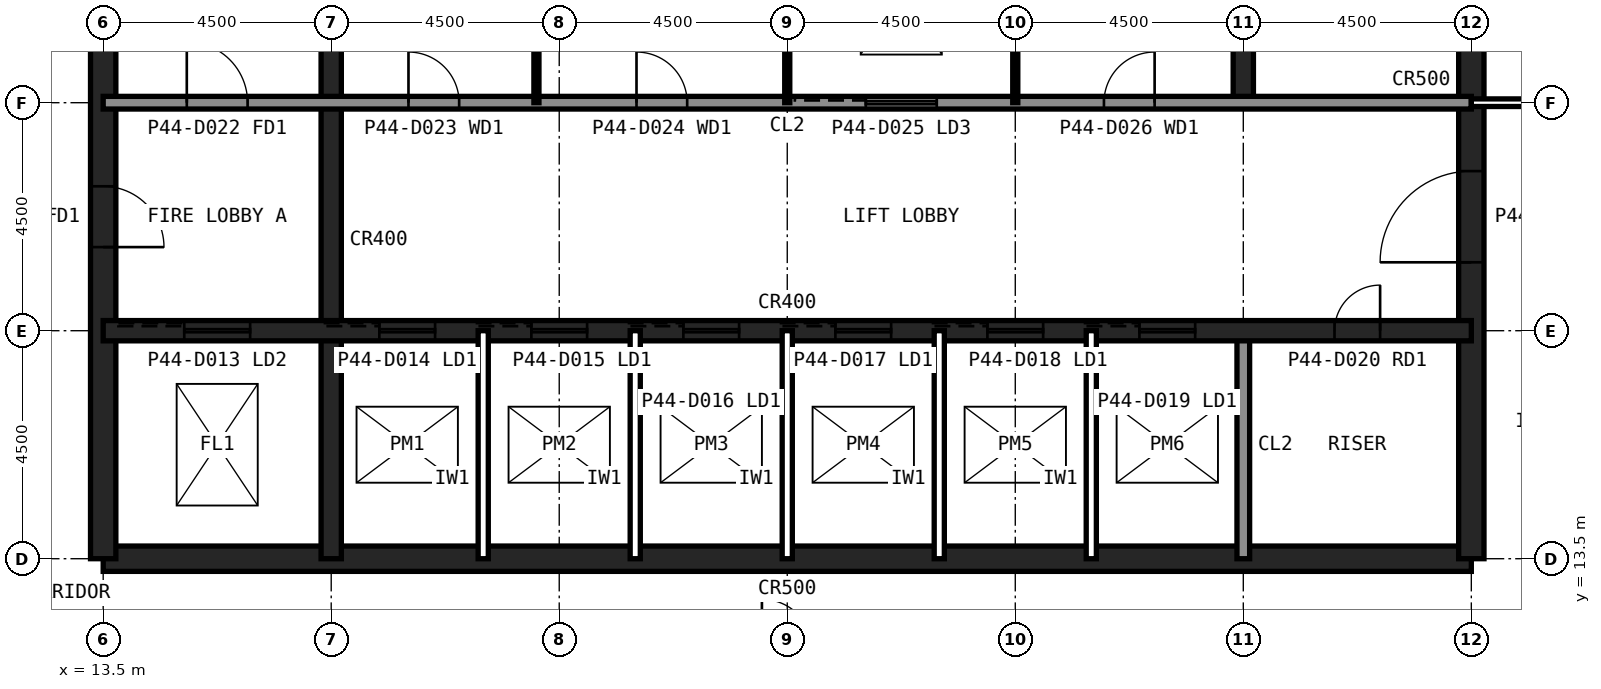
"""IFC4 building model, lengths in metres.
Left out: names, types, materials, properties, quantities, classifications, styles, units other than length and angle.
Written with IfcOpenShell. Run it as: python <this file> out.ifc"""

import sys

from ifc_helpers import new_model, si_unit, direction, frame, frame_2d, origin, place, context, subcontext, project, spatial, rectangle, extrude, element, fill, save


model = new_model("IFC4")
c1 = context("Model", 3, precision=1e-05, world=origin(), true_north=direction((0.0, 1.0)))
c2 = subcontext(c1, "Body", "Model", "MODEL_VIEW")
j1 = project(units=[si_unit("LENGTHUNIT", "METRE"), si_unit("PLANEANGLEUNIT", "RADIAN")], contexts=[c1])
p1 = place(None, origin())
s1 = spatial("IfcSite", under=j1, at=p1, CompositionType="ELEMENT")
p2 = place(p1, origin())
s2 = spatial("IfcBuilding", under=s1, at=p2, CompositionType="ELEMENT")
p3 = place(p2, frame((0.0, 0.0, 183.6)))
s3 = spatial("IfcBuildingStorey", under=s2, at=p3, CompositionType="ELEMENT", Elevation=183.6)
p4 = place(p3, frame((13.5, 13.5, 0.0), z_axis=(0.0, 0.0, 1.0), x_axis=(1.0, 0.0, 0.0)))
e1 = element("IfcWall", 1, at=p4, inside=s3, PredefinedType="SHEAR", context=c2, shape_type="SweptSolid", body=[
    extrude(rectangle(XDim=27.0, YDim=0.5, at=frame_2d((13.5, 0.0))), origin(), (0.0, 0.0, 1.0), 4.0),
])
p5 = place(p3, frame((40.5, 13.5, 0.0), z_axis=(0.0, 0.0, 1.0), x_axis=(0.0, 1.0, 0.0)))
e2 = element("IfcWall", 2, at=p5, inside=s3, PredefinedType="SHEAR", context=c2, shape_type="SweptSolid", body=[
    extrude(rectangle(XDim=27.0, YDim=0.5, at=frame_2d((13.5, 0.0))), origin(), (0.0, 0.0, 1.0), 4.0),
])
p6 = place(p5, frame((5.85, 0.0, 0.0)))
e3 = element("IfcOpeningElement", 3, at=p6, cuts=e2, PredefinedType="OPENING", context=c2, shape_type="SweptSolid", body=[
    extrude(rectangle(XDim=1.8, YDim=2.1, at=frame_2d((0.9, 1.05))), frame((0.0, 0.26, 0.0), z_axis=(0.0, -1.0, 0.0), x_axis=(1.0, 0.0, 0.0)), (0.0, 0.0, 1.0), 0.52),
])
p7 = place(p5, frame((19.65, 0.0, 0.0)))
e4 = element("IfcOpeningElement", 4, at=p7, cuts=e2, PredefinedType="OPENING", context=c2, shape_type="SweptSolid", body=[
    extrude(rectangle(XDim=1.2, YDim=2.1, at=frame_2d((0.6, 1.05))), frame((0.0, 0.26, 0.0), z_axis=(0.0, -1.0, 0.0), x_axis=(1.0, 0.0, 0.0)), (0.0, 0.0, 1.0), 0.52),
])
p8 = place(p3, frame((13.5, 40.5, 0.0), z_axis=(0.0, 0.0, 1.0), x_axis=(0.0, -1.0, 0.0)))
e5 = element("IfcWall", 5, at=p8, inside=s3, PredefinedType="SHEAR", context=c2, shape_type="SweptSolid", body=[
    extrude(rectangle(XDim=27.0, YDim=0.5, at=frame_2d((13.5, 0.0))), origin(), (0.0, 0.0, 1.0), 4.0),
])
p9 = place(p8, frame((19.65, 0.0, 0.0)))
e6 = element("IfcOpeningElement", 6, at=p9, cuts=e5, PredefinedType="OPENING", context=c2, shape_type="SweptSolid", body=[
    extrude(rectangle(XDim=1.2, YDim=2.1, at=frame_2d((0.6, 1.05))), frame((0.0, 0.26, 0.0), z_axis=(0.0, -1.0, 0.0), x_axis=(1.0, 0.0, 0.0)), (0.0, 0.0, 1.0), 0.52),
])
p10 = place(p8, frame((5.85, 0.0, 0.0)))
e7 = element("IfcOpeningElement", 7, at=p10, cuts=e5, PredefinedType="OPENING", context=c2, shape_type="SweptSolid", body=[
    extrude(rectangle(XDim=1.8, YDim=2.1, at=frame_2d((0.9, 1.05))), frame((0.0, 0.26, 0.0), z_axis=(0.0, -1.0, 0.0), x_axis=(1.0, 0.0, 0.0)), (0.0, 0.0, 1.0), 0.52),
])
p11 = place(p3, frame((18.0, 13.5, 0.0), z_axis=(0.0, 0.0, 1.0), x_axis=(0.0, 1.0, 0.0)))
e8 = element("IfcWall", 8, at=p11, inside=s3, PredefinedType="SHEAR", context=c2, shape_type="SweptSolid", body=[
    extrude(rectangle(XDim=18.0, YDim=0.4, at=frame_2d((9.0, 0.0))), origin(), (0.0, 0.0, 1.0), 4.0),
])
p12 = place(p3, frame((36.0, 13.5, 0.0), z_axis=(0.0, 0.0, 1.0), x_axis=(0.0, 1.0, 0.0)))
e9 = element("IfcWall", 9, at=p12, inside=s3, PredefinedType="SOLIDWALL", context=c2, shape_type="SweptSolid", body=[
    extrude(rectangle(XDim=4.5, YDim=0.25, at=frame_2d((2.25, 0.0))), origin(), (0.0, 0.0, 1.0), 3.84),
])
p13 = place(p3, frame((36.0, 22.5, 0.0), z_axis=(0.0, 0.0, 1.0), x_axis=(0.0, 1.0, 0.0)))
e10 = element("IfcWall", 10, at=p13, inside=s3, PredefinedType="SHEAR", context=c2, shape_type="SweptSolid", body=[
    extrude(rectangle(XDim=18.0, YDim=0.4, at=frame_2d((9.0, 0.0))), origin(), (0.0, 0.0, 1.0), 4.0),
])
p14 = place(p3, frame((13.5, 18.0, 0.0), z_axis=(0.0, 0.0, 1.0), x_axis=(1.0, 0.0, 0.0)))
e11 = element("IfcWall", 11, at=p14, inside=s3, PredefinedType="SHEAR", context=c2, shape_type="SweptSolid", body=[
    extrude(rectangle(XDim=27.0, YDim=0.4, at=frame_2d((13.5, 0.0))), origin(), (0.0, 0.0, 1.0), 4.0),
])
p15 = place(p14, frame((24.3, 0.0, 0.0)))
e12 = element("IfcOpeningElement", 12, at=p15, cuts=e11, PredefinedType="OPENING", context=c2, shape_type="SweptSolid", body=[
    extrude(rectangle(XDim=0.9, YDim=2.1, at=frame_2d((0.45, 1.05))), frame((0.0, 0.21, 0.0), z_axis=(0.0, -1.0, 0.0), x_axis=(1.0, 0.0, 0.0)), (0.0, 0.0, 1.0), 0.42),
])
p16 = place(p14, frame((5.45, 0.0, 0.0)))
e13 = element("IfcOpeningElement", 13, at=p16, cuts=e11, PredefinedType="OPENING", context=c2, shape_type="SweptSolid", body=[
    extrude(rectangle(XDim=1.1, YDim=2.1, at=frame_2d((0.55, 1.05))), frame((0.0, 0.21, 0.0), z_axis=(0.0, -1.0, 0.0), x_axis=(1.0, 0.0, 0.0)), (0.0, 0.0, 1.0), 0.42),
])
p17 = place(p14, frame((8.45, 0.0, 0.0)))
e14 = element("IfcOpeningElement", 14, at=p17, cuts=e11, PredefinedType="OPENING", context=c2, shape_type="SweptSolid", body=[
    extrude(rectangle(XDim=1.1, YDim=2.1, at=frame_2d((0.55, 1.05))), frame((0.0, 0.21, 0.0), z_axis=(0.0, -1.0, 0.0), x_axis=(1.0, 0.0, 0.0)), (0.0, 0.0, 1.0), 0.42),
])
p18 = place(p14, frame((11.45, 0.0, 0.0)))
e15 = element("IfcOpeningElement", 15, at=p18, cuts=e11, PredefinedType="OPENING", context=c2, shape_type="SweptSolid", body=[
    extrude(rectangle(XDim=1.1, YDim=2.1, at=frame_2d((0.55, 1.05))), frame((0.0, 0.21, 0.0), z_axis=(0.0, -1.0, 0.0), x_axis=(1.0, 0.0, 0.0)), (0.0, 0.0, 1.0), 0.42),
])
p19 = place(p14, frame((14.45, 0.0, 0.0)))
e16 = element("IfcOpeningElement", 16, at=p19, cuts=e11, PredefinedType="OPENING", context=c2, shape_type="SweptSolid", body=[
    extrude(rectangle(XDim=1.1, YDim=2.1, at=frame_2d((0.55, 1.05))), frame((0.0, 0.21, 0.0), z_axis=(0.0, -1.0, 0.0), x_axis=(1.0, 0.0, 0.0)), (0.0, 0.0, 1.0), 0.42),
])
p20 = place(p14, frame((17.45, 0.0, 0.0)))
e17 = element("IfcOpeningElement", 17, at=p20, cuts=e11, PredefinedType="OPENING", context=c2, shape_type="SweptSolid", body=[
    extrude(rectangle(XDim=1.1, YDim=2.1, at=frame_2d((0.55, 1.05))), frame((0.0, 0.21, 0.0), z_axis=(0.0, -1.0, 0.0), x_axis=(1.0, 0.0, 0.0)), (0.0, 0.0, 1.0), 0.42),
])
p21 = place(p14, frame((20.45, 0.0, 0.0)))
e18 = element("IfcOpeningElement", 18, at=p21, cuts=e11, PredefinedType="OPENING", context=c2, shape_type="SweptSolid", body=[
    extrude(rectangle(XDim=1.1, YDim=2.1, at=frame_2d((0.55, 1.05))), frame((0.0, 0.21, 0.0), z_axis=(0.0, -1.0, 0.0), x_axis=(1.0, 0.0, 0.0)), (0.0, 0.0, 1.0), 0.42),
])
p22 = place(p14, frame((1.6, 0.0, 0.0)))
e19 = element("IfcOpeningElement", 19, at=p22, cuts=e11, PredefinedType="OPENING", context=c2, shape_type="SweptSolid", body=[
    extrude(rectangle(XDim=1.3, YDim=2.2, at=frame_2d((0.65, 1.1))), frame((0.0, 0.21, 0.0), z_axis=(0.0, -1.0, 0.0), x_axis=(1.0, 0.0, 0.0)), (0.0, 0.0, 1.0), 0.42),
])
p23 = place(p3, frame((13.5, 22.5, 0.0), z_axis=(0.0, 0.0, 1.0), x_axis=(1.0, 0.0, 0.0)))
e20 = element("IfcWall", 20, at=p23, inside=s3, PredefinedType="SOLIDWALL", context=c2, shape_type="SweptSolid", body=[
    extrude(rectangle(XDim=27.0, YDim=0.25, at=frame_2d((13.5, 0.0))), origin(), (0.0, 0.0, 1.0), 3.84),
])
p24 = place(p23, frame((1.65, 0.0, 0.0)))
e21 = element("IfcOpeningElement", 21, at=p24, cuts=e20, PredefinedType="OPENING", context=c2, shape_type="SweptSolid", body=[
    extrude(rectangle(XDim=1.2, YDim=2.1, at=frame_2d((0.6, 1.05))), frame((0.0, 0.135, 0.0), z_axis=(0.0, -1.0, 0.0), x_axis=(1.0, 0.0, 0.0)), (0.0, 0.0, 1.0), 0.27),
])
p25 = place(p23, frame((6.025, 0.0, 0.0)))
e22 = element("IfcOpeningElement", 22, at=p25, cuts=e20, PredefinedType="OPENING", context=c2, shape_type="SweptSolid", body=[
    extrude(rectangle(XDim=1.0, YDim=2.1, at=frame_2d((0.5, 1.05))), frame((0.0, 0.135, 0.0), z_axis=(0.0, -1.0, 0.0), x_axis=(1.0, 0.0, 0.0)), (0.0, 0.0, 1.0), 0.27),
])
p26 = place(p23, frame((10.525, 0.0, 0.0)))
e23 = element("IfcOpeningElement", 23, at=p26, cuts=e20, PredefinedType="OPENING", context=c2, shape_type="SweptSolid", body=[
    extrude(rectangle(XDim=1.0, YDim=2.1, at=frame_2d((0.5, 1.05))), frame((0.0, 0.135, 0.0), z_axis=(0.0, -1.0, 0.0), x_axis=(1.0, 0.0, 0.0)), (0.0, 0.0, 1.0), 0.27),
])
p27 = place(p23, frame((19.75, 0.0, 0.0)))
e24 = element("IfcOpeningElement", 24, at=p27, cuts=e20, PredefinedType="OPENING", context=c2, shape_type="SweptSolid", body=[
    extrude(rectangle(XDim=1.0, YDim=2.1, at=frame_2d((0.5, 1.05))), frame((0.0, 0.135, 0.0), z_axis=(0.0, -1.0, 0.0), x_axis=(1.0, 0.0, 0.0)), (0.0, 0.0, 1.0), 0.27),
])
p28 = place(p23, frame((15.05, 0.0, 0.0)))
e25 = element("IfcOpeningElement", 25, at=p28, cuts=e20, PredefinedType="OPENING", context=c2, shape_type="SweptSolid", body=[
    extrude(rectangle(XDim=1.4, YDim=2.4, at=frame_2d((0.7, 1.2))), frame((0.0, 0.135, 0.0), z_axis=(0.0, -1.0, 0.0), x_axis=(1.0, 0.0, 0.0)), (0.0, 0.0, 1.0), 0.27),
])
for number, where, z_axis, x_axis in (
    (26, (21.0, 13.5, 0.0), (0.0, 0.0, 1.0), (0.0, 1.0, 0.0)),
    (27, (24.0, 13.5, 0.0), (0.0, 0.0, 1.0), (0.0, 1.0, 0.0)),
    (28, (27.0, 13.5, 0.0), (0.0, 0.0, 1.0), (0.0, 1.0, 0.0)),
    (29, (30.0, 13.5, 0.0), (0.0, 0.0, 1.0), (0.0, 1.0, 0.0)),
    (30, (33.0, 13.5, 0.0), (0.0, 0.0, 1.0), (0.0, 1.0, 0.0)),
):
    element("IfcWall", number, at=place(p3, frame(where, z_axis=z_axis, x_axis=x_axis)), inside=s3, PredefinedType="PARTITIONING", context=c2, shape_type="SweptSolid", body=[
        extrude(rectangle(XDim=4.5, YDim=0.2, at=frame_2d((2.25, 0.0))), origin(), (0.0, 0.0, 1.0), 3.84),
    ])
for number, where, z_axis, x_axis in (
    (31, (22.05, 22.5, 0.0), (0.0, 0.0, 1.0), (0.0, 1.0, 0.0)),
    (32, (27.0, 22.5, 0.0), (0.0, 0.0, 1.0), (0.0, 1.0, 0.0)),
    (33, (31.5, 22.5, 0.0), (0.0, 0.0, 1.0), (0.0, 1.0, 0.0)),
):
    element("IfcWall", number, at=place(p3, frame(where, z_axis=z_axis, x_axis=x_axis)), inside=s3, PredefinedType="PLUMBINGWALL", context=c2, shape_type="SweptSolid", body=[
        extrude(rectangle(XDim=9.0, YDim=0.1, at=frame_2d((4.5, 0.0))), origin(), (0.0, 0.0, 1.0), 3.84),
    ])
p29 = place(p3, frame((40.5, 22.5, 0.0), z_axis=(0.0, 0.0, 1.0), x_axis=(1.0, 0.0, 0.0)))
e34 = element("IfcWall", 34, at=p29, inside=s3, PredefinedType="PARTITIONING", context=c2, shape_type="SweptSolid", body=[
    extrude(rectangle(XDim=6.75, YDim=0.15, at=frame_2d((3.375, 0.0))), origin(), (0.0, 0.0, 1.0), 2.989),
])
p30 = place(p9, origin())
e35 = element("IfcDoor", 35, at=p30, inside=s3, OperationType="SINGLE_SWING_RIGHT", PredefinedType="DOOR", context=c2, shape_type="SweptSolid", body=[
    extrude(rectangle(XDim=1.2, YDim=2.1, at=frame_2d((0.6, 1.05))), frame((0.0, 0.025, 0.0), z_axis=(0.0, -1.0, 0.0), x_axis=(1.0, 0.0, 0.0)), (0.0, 0.0, 1.0), 0.05),
])
fill(e6, e35)
p31 = place(p6, origin())
e36 = element("IfcDoor", 36, at=p31, inside=s3, OperationType="SINGLE_SWING_LEFT", PredefinedType="DOOR", context=c2, shape_type="SweptSolid", body=[
    extrude(rectangle(XDim=1.8, YDim=2.1, at=frame_2d((0.9, 1.05))), frame((0.0, 0.025, 0.0), z_axis=(0.0, -1.0, 0.0), x_axis=(1.0, 0.0, 0.0)), (0.0, 0.0, 1.0), 0.05),
])
fill(e3, e36)
p32 = place(p24, origin())
e37 = element("IfcDoor", 37, at=p32, inside=s3, OperationType="SINGLE_SWING_LEFT", PredefinedType="DOOR", context=c2, shape_type="SweptSolid", body=[
    extrude(rectangle(XDim=1.2, YDim=2.1, at=frame_2d((0.6, 1.05))), frame((0.0, 0.025, 0.0), z_axis=(0.0, -1.0, 0.0), x_axis=(1.0, 0.0, 0.0)), (0.0, 0.0, 1.0), 0.05),
])
fill(e21, e37)
p33 = place(p25, origin())
e38 = element("IfcDoor", 38, at=p33, inside=s3, OperationType="SINGLE_SWING_LEFT", PredefinedType="DOOR", context=c2, shape_type="SweptSolid", body=[
    extrude(rectangle(XDim=1.0, YDim=2.1, at=frame_2d((0.5, 1.05))), frame((0.0, 0.025, 0.0), z_axis=(0.0, -1.0, 0.0), x_axis=(1.0, 0.0, 0.0)), (0.0, 0.0, 1.0), 0.05),
])
fill(e22, e38)
p34 = place(p26, origin())
e39 = element("IfcDoor", 39, at=p34, inside=s3, OperationType="SINGLE_SWING_LEFT", PredefinedType="DOOR", context=c2, shape_type="SweptSolid", body=[
    extrude(rectangle(XDim=1.0, YDim=2.1, at=frame_2d((0.5, 1.05))), frame((0.0, 0.025, 0.0), z_axis=(0.0, -1.0, 0.0), x_axis=(1.0, 0.0, 0.0)), (0.0, 0.0, 1.0), 0.05),
])
fill(e23, e39)
p35 = place(p27, origin())
e40 = element("IfcDoor", 40, at=p35, inside=s3, OperationType="SINGLE_SWING_RIGHT", PredefinedType="DOOR", context=c2, shape_type="SweptSolid", body=[
    extrude(rectangle(XDim=1.0, YDim=2.1, at=frame_2d((0.5, 1.05))), frame((0.0, 0.025, 0.0), z_axis=(0.0, -1.0, 0.0), x_axis=(1.0, 0.0, 0.0)), (0.0, 0.0, 1.0), 0.05),
])
fill(e24, e40)
p36 = place(p15, origin())
e41 = element("IfcDoor", 41, at=p36, inside=s3, OperationType="SINGLE_SWING_RIGHT", PredefinedType="DOOR", context=c2, shape_type="SweptSolid", body=[
    extrude(rectangle(XDim=0.9, YDim=2.1, at=frame_2d((0.45, 1.05))), frame((0.0, 0.025, 0.0), z_axis=(0.0, -1.0, 0.0), x_axis=(1.0, 0.0, 0.0)), (0.0, 0.0, 1.0), 0.05),
])
fill(e12, e41)
p37 = place(p16, origin())
e42 = element("IfcDoor", 42, at=p37, inside=s3, OperationType="SLIDING_TO_LEFT", PredefinedType="DOOR", context=c2, shape_type="SweptSolid", body=[
    extrude(rectangle(XDim=1.1, YDim=2.1, at=frame_2d((0.55, 1.05))), frame((0.0, 0.025, 0.0), z_axis=(0.0, -1.0, 0.0), x_axis=(1.0, 0.0, 0.0)), (0.0, 0.0, 1.0), 0.05),
])
fill(e13, e42)
p38 = place(p17, origin())
e43 = element("IfcDoor", 43, at=p38, inside=s3, OperationType="SLIDING_TO_LEFT", PredefinedType="DOOR", context=c2, shape_type="SweptSolid", body=[
    extrude(rectangle(XDim=1.1, YDim=2.1, at=frame_2d((0.55, 1.05))), frame((0.0, 0.025, 0.0), z_axis=(0.0, -1.0, 0.0), x_axis=(1.0, 0.0, 0.0)), (0.0, 0.0, 1.0), 0.05),
])
fill(e14, e43)
p39 = place(p18, origin())
e44 = element("IfcDoor", 44, at=p39, inside=s3, OperationType="SLIDING_TO_LEFT", PredefinedType="DOOR", context=c2, shape_type="SweptSolid", body=[
    extrude(rectangle(XDim=1.1, YDim=2.1, at=frame_2d((0.55, 1.05))), frame((0.0, 0.025, 0.0), z_axis=(0.0, -1.0, 0.0), x_axis=(1.0, 0.0, 0.0)), (0.0, 0.0, 1.0), 0.05),
])
fill(e15, e44)
p40 = place(p19, origin())
e45 = element("IfcDoor", 45, at=p40, inside=s3, OperationType="SLIDING_TO_LEFT", PredefinedType="DOOR", context=c2, shape_type="SweptSolid", body=[
    extrude(rectangle(XDim=1.1, YDim=2.1, at=frame_2d((0.55, 1.05))), frame((0.0, 0.025, 0.0), z_axis=(0.0, -1.0, 0.0), x_axis=(1.0, 0.0, 0.0)), (0.0, 0.0, 1.0), 0.05),
])
fill(e16, e45)
p41 = place(p20, origin())
e46 = element("IfcDoor", 46, at=p41, inside=s3, OperationType="SLIDING_TO_LEFT", PredefinedType="DOOR", context=c2, shape_type="SweptSolid", body=[
    extrude(rectangle(XDim=1.1, YDim=2.1, at=frame_2d((0.55, 1.05))), frame((0.0, 0.025, 0.0), z_axis=(0.0, -1.0, 0.0), x_axis=(1.0, 0.0, 0.0)), (0.0, 0.0, 1.0), 0.05),
])
fill(e17, e46)
p42 = place(p21, origin())
e47 = element("IfcDoor", 47, at=p42, inside=s3, OperationType="SLIDING_TO_LEFT", PredefinedType="DOOR", context=c2, shape_type="SweptSolid", body=[
    extrude(rectangle(XDim=1.1, YDim=2.1, at=frame_2d((0.55, 1.05))), frame((0.0, 0.025, 0.0), z_axis=(0.0, -1.0, 0.0), x_axis=(1.0, 0.0, 0.0)), (0.0, 0.0, 1.0), 0.05),
])
fill(e18, e47)
p43 = place(p22, origin())
e48 = element("IfcDoor", 48, at=p43, inside=s3, OperationType="SLIDING_TO_LEFT", PredefinedType="DOOR", context=c2, shape_type="SweptSolid", body=[
    extrude(rectangle(XDim=1.3, YDim=2.2, at=frame_2d((0.65, 1.1))), frame((0.0, 0.025, 0.0), z_axis=(0.0, -1.0, 0.0), x_axis=(1.0, 0.0, 0.0)), (0.0, 0.0, 1.0), 0.05),
])
fill(e19, e48)
p44 = place(p28, origin())
e49 = element("IfcDoor", 49, at=p44, inside=s3, OperationType="SLIDING_TO_LEFT", PredefinedType="DOOR", context=c2, shape_type="SweptSolid", body=[
    extrude(rectangle(XDim=1.4, YDim=2.4, at=frame_2d((0.7, 1.2))), frame((0.0, 0.025, 0.0), z_axis=(0.0, -1.0, 0.0), x_axis=(1.0, 0.0, 0.0)), (0.0, 0.0, 1.0), 0.05),
])
fill(e25, e49)
save(model, sys.argv[1])
